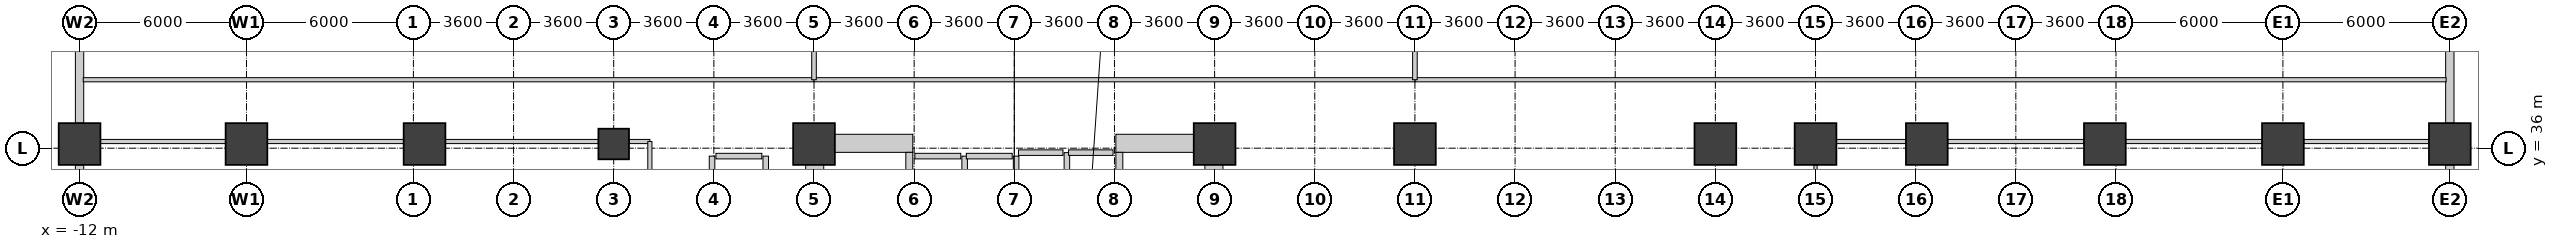
"""IFC4 building model, lengths in metres.
Left out: names, types, materials, properties, quantities, classifications, styles, units other than length and angle.
Written with IfcOpenShell. Run it as: python <this file> out.ifc"""

import sys

from ifc_helpers import new_model, si_unit, direction, frame, frame_2d, origin, origin_2d, place, context, subcontext, project, spatial, rectangle, circle, extrude, source, transform, mapped, element, fill, save


model = new_model("IFC4")
c1 = context("Model", 3, precision=1e-05, world=origin(), true_north=direction((0.0, 1.0)))
c2 = subcontext(c1, "Body", "Model", "MODEL_VIEW")
j1 = project(units=[si_unit("LENGTHUNIT", "METRE"), si_unit("PLANEANGLEUNIT", "RADIAN")], contexts=[c1])
p1 = place(None, origin())
s1 = spatial("IfcSite", under=j1, at=p1, CompositionType="ELEMENT")
p2 = place(p1, origin())
s2 = spatial("IfcBuilding", under=s1, at=p2, CompositionType="ELEMENT")
p3 = place(p2, origin())
s3 = spatial("IfcBuildingStorey", under=s2, at=p3, CompositionType="ELEMENT", Elevation=0.0)
for number, where, z_axis, x_axis in (
    (1, (14.425, 28.2, 0.0), (0.0, 0.0, 1.0), (0.0, 1.0, 0.0)),
    (2, (28.775, 28.2, 0.0), (0.0, 0.0, 1.0), (0.0, 1.0, 0.0)),
):
    element("IfcWall", number, at=place(p3, frame(where, z_axis=z_axis, x_axis=x_axis)), inside=s3, PredefinedType="SHEAR", context=c2, shape_type="SweptSolid", body=[
        extrude(rectangle(XDim=8.3, YDim=0.65, at=frame_2d((4.15, 0.0))), origin(), (0.0, 0.0, 1.0), 5.12),
    ])
for number, where, z_axis, x_axis in (
    (3, (14.75, 36.175, 0.0), (0.0, 0.0, 1.0), (1.0, 0.0, 0.0)),
    (4, (25.25, 36.175, 0.0), (0.0, 0.0, 1.0), (1.0, 0.0, 0.0)),
):
    element("IfcWall", number, at=place(p3, frame(where, z_axis=z_axis, x_axis=x_axis)), inside=s3, PredefinedType="SHEAR", context=c2, shape_type="SweptSolid", body=[
        extrude(rectangle(XDim=3.2, YDim=0.65, at=frame_2d((1.6, 0.0))), origin(), (0.0, 0.0, 1.0), 5.12),
    ])
p4 = place(p3, frame((17.825, 28.85, 0.0), z_axis=(0.0, 0.0, 1.0), x_axis=(0.0, 1.0, 0.0)))
e5 = element("IfcWall", 5, at=p4, inside=s3, PredefinedType="SHEAR", context=c2, shape_type="SweptSolid", body=[
    extrude(rectangle(XDim=7.0, YDim=0.25, at=frame_2d((3.5, 0.0))), origin(), (0.0, 0.0, 1.0), 5.12),
])
p5 = place(p4, frame((0.15, 0.0, 0.0)))
e6 = element("IfcOpeningElement", 6, at=p5, cuts=e5, PredefinedType="OPENING", context=c2, shape_type="SweptSolid", body=[
    extrude(rectangle(XDim=1.1, YDim=2.08, at=frame_2d((0.55, 1.04))), frame((0.0, 0.135, 0.0), z_axis=(0.0, -1.0, 0.0), x_axis=(1.0, 0.0, 0.0)), (0.0, 0.0, 1.0), 0.27),
])
p6 = place(p3, frame((25.375, 28.85, 0.0), z_axis=(0.0, 0.0, 1.0), x_axis=(0.0, 1.0, 0.0)))
e7 = element("IfcWall", 7, at=p6, inside=s3, PredefinedType="SHEAR", context=c2, shape_type="SweptSolid", body=[
    extrude(rectangle(XDim=7.0, YDim=0.25, at=frame_2d((3.5, 0.0))), origin(), (0.0, 0.0, 1.0), 5.12),
])
p7 = place(p6, frame((0.15, 0.0, 0.0)))
e8 = element("IfcOpeningElement", 8, at=p7, cuts=e7, PredefinedType="OPENING", context=c2, shape_type="SweptSolid", body=[
    extrude(rectangle(XDim=1.1, YDim=2.08, at=frame_2d((0.55, 1.04))), frame((0.0, 0.135, 0.0), z_axis=(0.0, -1.0, 0.0), x_axis=(1.0, 0.0, 0.0)), (0.0, 0.0, 1.0), 0.27),
])
m1 = source(origin(), c2, "Body", "SweptSolid", [
    extrude(circle(Radius=0.55, at=origin_2d()), origin(), (0.0, 0.0, 1.0), 5.4),
])
p8 = place(p3, frame((7.2, 36.15, 0.0), z_axis=(0.0, 0.0, 1.0), x_axis=(1.0, 0.0, 0.0)))
e9 = element("IfcColumn", 9, at=p8, inside=s3, PredefinedType="COLUMN", context=c2, shape_type="MappedRepresentation", body=[
    mapped(m1, transform((0.0, 0.0, 0.0), x_axis=(1.0, 0.0, 0.0), y_axis=(0.0, 1.0, 0.0), z_axis=(0.0, 0.0, 1.0), scale=1.0)),
])
m2 = source(origin(), c2, "Body", "SweptSolid", [
    extrude(rectangle(XDim=1.5, YDim=1.5, at=origin_2d()), origin(), (0.0, 0.0, 1.0), 5.4),
])
for number, where, z_axis, x_axis in (
    (10, (14.4, 36.15, 0.0), (0.0, 0.0, 1.0), (1.0, 0.0, 0.0)),
    (11, (28.8, 36.15, 0.0), (0.0, 0.0, 1.0), (1.0, 0.0, 0.0)),
    (12, (36.0, 36.15, 0.0), (0.0, 0.0, 1.0), (1.0, 0.0, 0.0)),
    (13, (46.8, 36.15, 0.0), (0.0, 0.0, 1.0), (1.0, 0.0, 0.0)),
    (14, (50.4, 36.15, 0.0), (0.0, 0.0, 1.0), (1.0, 0.0, 0.0)),
    (15, (54.4, 36.15, 0.0), (0.0, 0.0, 1.0), (1.0, 0.0, 0.0)),
    (16, (0.4, 36.15, 0.0), (0.0, 0.0, 1.0), (1.0, 0.0, 0.0)),
    (17, (60.8, 36.15, 0.0), (0.0, 0.0, 1.0), (1.0, 0.0, 0.0)),
    (18, (-12.0, 36.15, 0.0), (0.0, 0.0, 1.0), (1.0, 0.0, 0.0)),
    (19, (-6.0, 36.15, 0.0), (0.0, 0.0, 1.0), (1.0, 0.0, 0.0)),
    (20, (67.2, 36.15, 0.0), (0.0, 0.0, 1.0), (1.0, 0.0, 0.0)),
    (21, (73.2, 36.15, 0.0), (0.0, 0.0, 1.0), (1.0, 0.0, 0.0)),
):
    element("IfcColumn", number, at=place(p3, frame(where, z_axis=z_axis, x_axis=x_axis)), inside=s3, PredefinedType="COLUMN", context=c2, shape_type="MappedRepresentation", body=[
        mapped(m2, transform((0.0, 0.0, 0.0), x_axis=(1.0, 0.0, 0.0), y_axis=(0.0, 1.0, 0.0), z_axis=(0.0, 0.0, 1.0), scale=1.0)),
    ])
p9 = place(p3, frame((73.2, 35.399, 0.0), z_axis=(0.0, 0.0, 1.0), x_axis=(0.0, -1.0, 0.0)))
e22 = element("IfcWall", 22, at=p9, inside=s3, PredefinedType="STANDARD", context=c2, shape_type="SweptSolid", body=[
    extrude(rectangle(XDim=5.998, YDim=0.3, at=frame_2d((2.999, 0.0))), origin(), (0.0, 0.0, 1.0), 4.5),
])
p10 = place(p9, frame((2.524, 0.0, 0.9)))
e23 = element("IfcOpeningElement", 23, at=p10, cuts=e22, PredefinedType="OPENING", context=c2, shape_type="SweptSolid", body=[
    extrude(rectangle(XDim=0.95, YDim=1.75, at=frame_2d((0.475, 0.875))), frame((0.0, 0.16, 0.0), z_axis=(0.0, -1.0, 0.0), x_axis=(1.0, 0.0, 0.0)), (0.0, 0.0, 1.0), 0.32),
])
p11 = place(p9, frame((1.037, 0.0, 0.9)))
e24 = element("IfcOpeningElement", 24, at=p11, cuts=e22, PredefinedType="OPENING", context=c2, shape_type="SweptSolid", body=[
    extrude(rectangle(XDim=0.95, YDim=1.75, at=frame_2d((0.475, 0.875))), frame((0.0, 0.16, 0.0), z_axis=(0.0, -1.0, 0.0), x_axis=(1.0, 0.0, 0.0)), (0.0, 0.0, 1.0), 0.32),
])
p12 = place(p3, frame((73.2, 44.099, 0.0), z_axis=(0.0, 0.0, 1.0), x_axis=(0.0, -1.0, 0.0)))
e25 = element("IfcWall", 25, at=p12, inside=s3, PredefinedType="STANDARD", context=c2, shape_type="SweptSolid", body=[
    extrude(rectangle(XDim=7.198, YDim=0.3, at=frame_2d((3.599, 0.0))), origin(), (0.0, 0.0, 1.0), 4.5),
])
p13 = place(p12, frame((0.6, 0.0, 0.9)))
e26 = element("IfcOpeningElement", 26, at=p13, cuts=e25, PredefinedType="OPENING", context=c2, shape_type="SweptSolid", body=[
    extrude(rectangle(XDim=2.4, YDim=2.5, at=frame_2d((1.2, 1.25))), frame((0.0, 0.16, 0.0), z_axis=(0.0, -1.0, 0.0), x_axis=(1.0, 0.0, 0.0)), (0.0, 0.0, 1.0), 0.32),
])
p14 = place(p12, frame((3.7, 0.0, 0.9)))
e27 = element("IfcOpeningElement", 27, at=p14, cuts=e25, PredefinedType="OPENING", context=c2, shape_type="SweptSolid", body=[
    extrude(rectangle(XDim=0.95, YDim=1.75, at=frame_2d((0.475, 0.875))), frame((0.0, 0.16, 0.0), z_axis=(0.0, -1.0, 0.0), x_axis=(1.0, 0.0, 0.0)), (0.0, 0.0, 1.0), 0.32),
])
p15 = place(p3, frame((-12.0, 36.901, 0.0), z_axis=(0.0, 0.0, 1.0), x_axis=(0.0, 1.0, 0.0)))
e28 = element("IfcWall", 28, at=p15, inside=s3, PredefinedType="STANDARD", context=c2, shape_type="SweptSolid", body=[
    extrude(rectangle(XDim=7.198, YDim=0.3, at=frame_2d((3.599, 0.0))), origin(), (0.0, 0.0, 1.0), 4.5),
])
p16 = place(p15, frame((4.198, 0.0, 0.9)))
e29 = element("IfcOpeningElement", 29, at=p16, cuts=e28, PredefinedType="OPENING", context=c2, shape_type="SweptSolid", body=[
    extrude(rectangle(XDim=2.4, YDim=2.5, at=frame_2d((1.2, 1.25))), frame((0.0, 0.16, 0.0), z_axis=(0.0, -1.0, 0.0), x_axis=(1.0, 0.0, 0.0)), (0.0, 0.0, 1.0), 0.32),
])
p17 = place(p15, frame((2.548, 0.0, 0.9)))
e30 = element("IfcOpeningElement", 30, at=p17, cuts=e28, PredefinedType="OPENING", context=c2, shape_type="SweptSolid", body=[
    extrude(rectangle(XDim=0.95, YDim=1.75, at=frame_2d((0.475, 0.875))), frame((0.0, 0.16, 0.0), z_axis=(0.0, -1.0, 0.0), x_axis=(1.0, 0.0, 0.0)), (0.0, 0.0, 1.0), 0.32),
])
p18 = place(p3, frame((-12.0, 29.401, 0.0), z_axis=(0.0, 0.0, 1.0), x_axis=(0.0, 1.0, 0.0)))
e31 = element("IfcWall", 31, at=p18, inside=s3, PredefinedType="STANDARD", context=c2, shape_type="SweptSolid", body=[
    extrude(rectangle(XDim=5.998, YDim=0.3, at=frame_2d((2.999, 0.0))), origin(), (0.0, 0.0, 1.0), 4.5),
])
p19 = place(p18, frame((2.074, 0.0, 0.0)))
e32 = element("IfcOpeningElement", 32, at=p19, cuts=e31, PredefinedType="OPENING", context=c2, shape_type="SweptSolid", body=[
    extrude(rectangle(XDim=1.85, YDim=2.25, at=frame_2d((0.925, 1.125))), frame((0.0, 0.16, 0.0), z_axis=(0.0, -1.0, 0.0), x_axis=(1.0, 0.0, 0.0)), (0.0, 0.0, 1.0), 0.32),
])
p20 = place(p3, frame((18.025, 35.715, 0.0), z_axis=(0.0, 0.0, 1.0), x_axis=(1.0, 0.0, 0.0)))
e33 = element("IfcWall", 33, at=p20, inside=s3, PredefinedType="PARTITIONING", context=c2, shape_type="SweptSolid", body=[
    extrude(rectangle(XDim=1.65, YDim=0.2, at=frame_2d((0.825, 0.0))), origin(), (0.0, 0.0, 1.0), 5.1),
])
p21 = place(p3, frame((19.815, 33.485, 0.0), z_axis=(0.0, 0.0, 1.0), x_axis=(0.0, 1.0, 0.0)))
e34 = element("IfcWall", 34, at=p21, inside=s3, PredefinedType="PARTITIONING", context=c2, shape_type="SweptSolid", body=[
    extrude(rectangle(XDim=2.23, YDim=0.2, at=frame_2d((1.115, 0.0))), origin(), (0.0, 0.0, 1.0), 5.1),
])
p22 = place(p3, frame((19.875, 35.715, 0.0), z_axis=(0.0, 0.0, 1.0), x_axis=(1.0, 0.0, 0.0)))
e35 = element("IfcWall", 35, at=p22, inside=s3, PredefinedType="PARTITIONING", context=c2, shape_type="SweptSolid", body=[
    extrude(rectangle(XDim=1.65, YDim=0.2, at=frame_2d((0.825, 0.0))), origin(), (0.0, 0.0, 1.0), 5.1),
])
p23 = place(p3, frame((21.665, 33.485, 0.0), z_axis=(0.0, 0.0, 1.0), x_axis=(0.0, 1.0, 0.0)))
e36 = element("IfcWall", 36, at=p23, inside=s3, PredefinedType="PARTITIONING", context=c2, shape_type="SweptSolid", body=[
    extrude(rectangle(XDim=2.23, YDim=0.2, at=frame_2d((1.115, 0.0))), origin(), (0.0, 0.0, 1.0), 5.1),
])
p24 = place(p3, frame((10.875, 35.715, 0.0), z_axis=(0.0, 0.0, 1.0), x_axis=(1.0, 0.0, 0.0)))
e37 = element("IfcWall", 37, at=p24, inside=s3, PredefinedType="PARTITIONING", context=c2, shape_type="SweptSolid", body=[
    extrude(rectangle(XDim=1.65, YDim=0.2, at=frame_2d((0.825, 0.0))), origin(), (0.0, 0.0, 1.0), 5.1),
])
for number, where, z_axis, x_axis in (
    (38, (10.735, 33.485, 0.0), (0.0, 0.0, 1.0), (0.0, 1.0, 0.0)),
    (39, (12.665, 33.485, 0.0), (0.0, 0.0, 1.0), (0.0, 1.0, 0.0)),
):
    element("IfcWall", number, at=place(p3, frame(where, z_axis=z_axis, x_axis=x_axis)), inside=s3, PredefinedType="PARTITIONING", context=c2, shape_type="SweptSolid", body=[
        extrude(rectangle(XDim=2.23, YDim=0.2, at=frame_2d((1.115, 0.0))), origin(), (0.0, 0.0, 1.0), 5.1),
    ])
p25 = place(p3, frame((21.75, 35.84, 0.0), z_axis=(0.0, 0.0, 1.0), x_axis=(1.0, 0.0, 0.0)))
e40 = element("IfcWall", 40, at=p25, inside=s3, PredefinedType="PARTITIONING", context=c2, shape_type="SweptSolid", body=[
    extrude(rectangle(XDim=1.6, YDim=0.2, at=frame_2d((0.8, 0.0))), origin(), (0.0, 0.0, 1.0), 3.9),
])
p26 = place(p3, frame((23.49, 33.16, 0.0), z_axis=(0.0, 0.0, 1.0), x_axis=(0.0, 1.0, 0.0)))
e41 = element("IfcWall", 41, at=p26, inside=s3, PredefinedType="PARTITIONING", context=c2, shape_type="SweptSolid", body=[
    extrude(rectangle(XDim=2.68, YDim=0.2, at=frame_2d((1.34, 0.0))), origin(), (0.0, 0.0, 1.0), 5.1),
])
p27 = place(p3, frame((23.55, 35.84, 0.0), z_axis=(0.0, 0.0, 1.0), x_axis=(1.0, 0.0, 0.0)))
e42 = element("IfcWall", 42, at=p27, inside=s3, PredefinedType="PARTITIONING", context=c2, shape_type="SweptSolid", body=[
    extrude(rectangle(XDim=1.6, YDim=0.2, at=frame_2d((0.8, 0.0))), origin(), (0.0, 0.0, 1.0), 3.9),
])
p28 = place(p3, frame((36.0, 38.46, 0.0), z_axis=(0.0, 0.0, 1.0), x_axis=(1.0, 0.0, 0.0)))
e43 = element("IfcWall", 43, at=p28, inside=s3, PredefinedType="PARTITIONING", context=c2, shape_type="SweptSolid", body=[
    extrude(rectangle(XDim=37.068, YDim=0.15, at=frame_2d((18.534, 0.0))), origin(), (0.0, 0.0, 1.0), 5.1),
])
p29 = place(p28, frame((17.884, 0.0, 0.0)))
e44 = element("IfcOpeningElement", 44, at=p29, cuts=e43, PredefinedType="OPENING", context=c2, shape_type="SweptSolid", body=[
    extrude(rectangle(XDim=1.3, YDim=2.12, at=frame_2d((0.65, 1.06))), frame((0.0, 0.085, 0.0), z_axis=(0.0, -1.0, 0.0), x_axis=(1.0, 0.0, 0.0)), (0.0, 0.0, 1.0), 0.17),
])
p30 = place(p3, frame((-11.868, 38.46, 0.0), z_axis=(0.0, 0.0, 1.0), x_axis=(1.0, 0.0, 0.0)))
e45 = element("IfcWall", 45, at=p30, inside=s3, PredefinedType="PARTITIONING", context=c2, shape_type="SweptSolid", body=[
    extrude(rectangle(XDim=26.268, YDim=0.15, at=frame_2d((13.134, 0.0))), origin(), (0.0, 0.0, 1.0), 5.1),
])
p31 = place(p30, frame((12.484, 0.0, 0.0)))
e46 = element("IfcOpeningElement", 46, at=p31, cuts=e45, PredefinedType="OPENING", context=c2, shape_type="SweptSolid", body=[
    extrude(rectangle(XDim=1.3, YDim=2.12, at=frame_2d((0.65, 1.06))), frame((0.0, 0.085, 0.0), z_axis=(0.0, -1.0, 0.0), x_axis=(1.0, 0.0, 0.0)), (0.0, 0.0, 1.0), 0.17),
])
p32 = place(p3, frame((51.15, 36.24, 0.0), z_axis=(0.0, 0.0, 1.0), x_axis=(1.0, 0.0, 0.0)))
e47 = element("IfcWall", 47, at=p32, inside=s3, PredefinedType="PARTITIONING", context=c2, shape_type="SweptSolid", body=[
    extrude(rectangle(XDim=2.5, YDim=0.15, at=frame_2d((1.25, 0.0))), origin(), (0.0, 0.0, 1.0), 4.4),
])
p33 = place(p32, frame((0.6, 0.0, 0.0)))
e48 = element("IfcOpeningElement", 48, at=p33, cuts=e47, PredefinedType="OPENING", context=c2, shape_type="SweptSolid", body=[
    extrude(rectangle(XDim=1.3, YDim=2.12, at=frame_2d((0.65, 1.06))), frame((0.0, 0.085, 0.0), z_axis=(0.0, -1.0, 0.0), x_axis=(1.0, 0.0, 0.0)), (0.0, 0.0, 1.0), 0.17),
])
p34 = place(p3, frame((55.15, 36.24, 0.0), z_axis=(0.0, 0.0, 1.0), x_axis=(1.0, 0.0, 0.0)))
e49 = element("IfcWall", 49, at=p34, inside=s3, PredefinedType="PARTITIONING", context=c2, shape_type="SweptSolid", body=[
    extrude(rectangle(XDim=4.9, YDim=0.15, at=frame_2d((2.45, 0.0))), origin(), (0.0, 0.0, 1.0), 4.4),
])
p35 = place(p3, frame((61.55, 36.24, 0.0), z_axis=(0.0, 0.0, 1.0), x_axis=(1.0, 0.0, 0.0)))
e50 = element("IfcWall", 50, at=p35, inside=s3, PredefinedType="PARTITIONING", context=c2, shape_type="SweptSolid", body=[
    extrude(rectangle(XDim=4.9, YDim=0.15, at=frame_2d((2.45, 0.0))), origin(), (0.0, 0.0, 1.0), 4.4),
])
p36 = place(p3, frame((67.95, 36.24, 0.0), z_axis=(0.0, 0.0, 1.0), x_axis=(1.0, 0.0, 0.0)))
e51 = element("IfcWall", 51, at=p36, inside=s3, PredefinedType="PARTITIONING", context=c2, shape_type="SweptSolid", body=[
    extrude(rectangle(XDim=4.5, YDim=0.15, at=frame_2d((2.25, 0.0))), origin(), (0.0, 0.0, 1.0), 4.4),
])
p37 = place(p3, frame((14.4, 38.46, 0.0), z_axis=(0.0, 0.0, 1.0), x_axis=(1.0, 0.0, 0.0)))
e52 = element("IfcWall", 52, at=p37, inside=s3, PredefinedType="PARTITIONING", context=c2, shape_type="SweptSolid", body=[
    extrude(rectangle(XDim=21.6, YDim=0.15, at=frame_2d((10.8, 0.0))), origin(), (0.0, 0.0, 1.0), 5.1),
])
p38 = place(p37, frame((10.15, 0.0, 0.0)))
e53 = element("IfcOpeningElement", 53, at=p38, cuts=e52, PredefinedType="OPENING", context=c2, shape_type="SweptSolid", body=[
    extrude(rectangle(XDim=1.3, YDim=2.12, at=frame_2d((0.65, 1.06))), frame((0.0, 0.085, 0.0), z_axis=(0.0, -1.0, 0.0), x_axis=(1.0, 0.0, 0.0)), (0.0, 0.0, 1.0), 0.17),
])
p39 = place(p3, frame((-11.25, 36.24, 0.0), z_axis=(0.0, 0.0, 1.0), x_axis=(1.0, 0.0, 0.0)))
e54 = element("IfcWall", 54, at=p39, inside=s3, PredefinedType="PARTITIONING", context=c2, shape_type="SweptSolid", body=[
    extrude(rectangle(XDim=4.5, YDim=0.15, at=frame_2d((2.25, 0.0))), origin(), (0.0, 0.0, 1.0), 4.4),
])
p40 = place(p3, frame((-5.25, 36.24, 0.0), z_axis=(0.0, 0.0, 1.0), x_axis=(1.0, 0.0, 0.0)))
e55 = element("IfcWall", 55, at=p40, inside=s3, PredefinedType="PARTITIONING", context=c2, shape_type="SweptSolid", body=[
    extrude(rectangle(XDim=4.9, YDim=0.15, at=frame_2d((2.45, 0.0))), origin(), (0.0, 0.0, 1.0), 4.4),
])
p41 = place(p3, frame((1.15, 36.24, 0.0), z_axis=(0.0, 0.0, 1.0), x_axis=(1.0, 0.0, 0.0)))
e56 = element("IfcWall", 56, at=p41, inside=s3, PredefinedType="PARTITIONING", context=c2, shape_type="SweptSolid", body=[
    extrude(rectangle(XDim=5.5, YDim=0.15, at=frame_2d((2.75, 0.0))), origin(), (0.0, 0.0, 1.0), 4.4),
])
p42 = place(p3, frame((7.75, 36.24, 0.0), z_axis=(0.0, 0.0, 1.0), x_axis=(1.0, 0.0, 0.0)))
e57 = element("IfcWall", 57, at=p42, inside=s3, PredefinedType="PARTITIONING", context=c2, shape_type="SweptSolid", body=[
    extrude(rectangle(XDim=0.75, YDim=0.15, at=frame_2d((0.375, 0.0))), origin(), (0.0, 0.0, 1.0), 4.4),
])
p43 = place(p3, frame((8.5, 28.56, 0.0), z_axis=(0.0, 0.0, 1.0), x_axis=(0.0, 1.0, 0.0)))
e58 = element("IfcWall", 58, at=p43, inside=s3, PredefinedType="PARTITIONING", context=c2, shape_type="SweptSolid", body=[
    extrude(rectangle(XDim=7.68, YDim=0.15, at=frame_2d((3.84, 0.0))), origin(), (0.0, 0.0, 1.0), 5.1),
])
p44 = place(p3, frame((50.4, 29.4, 0.0), z_axis=(0.0, 0.0, 1.0), x_axis=(0.0, 1.0, 0.0)))
e59 = element("IfcWall", 59, at=p44, inside=s3, PredefinedType="PARTITIONING", context=c2, shape_type="SweptSolid", body=[
    extrude(rectangle(XDim=6.0, YDim=0.115, at=frame_2d((3.0, 0.0))), origin(), (0.0, 0.0, 1.0), 5.1),
])
for number, where, z_axis, x_axis in (
    (60, (14.4, 38.46, 0.0), (0.0, 0.0, 1.0), (0.0, 1.0, 0.0)),
    (61, (36.0, 38.46, 0.0), (0.0, 0.0, 1.0), (0.0, 1.0, 0.0)),
):
    element("IfcWall", number, at=place(p3, frame(where, z_axis=z_axis, x_axis=x_axis)), inside=s3, PredefinedType="PARTITIONING", context=c2, shape_type="SweptSolid", body=[
        extrude(rectangle(XDim=6.408, YDim=0.165, at=frame_2d((3.204, 0.0))), origin(), (0.0, 0.0, 1.0), 4.5),
    ])
p45 = place(p14, origin())
e62 = element("IfcWindow", 62, at=p45, inside=s3, PartitioningType="SINGLE_PANEL", PredefinedType="WINDOW", context=c2, shape_type="SweptSolid", body=[
    extrude(rectangle(XDim=0.95, YDim=1.75, at=frame_2d((0.475, 0.875))), frame((0.0, 0.03, 0.0), z_axis=(0.0, -1.0, 0.0), x_axis=(1.0, 0.0, 0.0)), (0.0, 0.0, 1.0), 0.06),
])
fill(e27, e62)
p46 = place(p17, origin())
e63 = element("IfcWindow", 63, at=p46, inside=s3, PartitioningType="SINGLE_PANEL", PredefinedType="WINDOW", context=c2, shape_type="SweptSolid", body=[
    extrude(rectangle(XDim=0.95, YDim=1.75, at=frame_2d((0.475, 0.875))), frame((0.0, 0.03, 0.0), z_axis=(0.0, -1.0, 0.0), x_axis=(1.0, 0.0, 0.0)), (0.0, 0.0, 1.0), 0.06),
])
fill(e30, e63)
p47 = place(p29, origin())
e64 = element("IfcDoor", 64, at=p47, inside=s3, OperationType="DOUBLE_DOOR_SINGLE_SWING", PredefinedType="DOOR", context=c2, shape_type="SweptSolid", body=[
    extrude(rectangle(XDim=1.3, YDim=2.12, at=frame_2d((0.65, 1.06))), frame((0.0, 0.025, 0.0), z_axis=(0.0, -1.0, 0.0), x_axis=(1.0, 0.0, 0.0)), (0.0, 0.0, 1.0), 0.05),
])
fill(e44, e64)
p48 = place(p31, origin())
e65 = element("IfcDoor", 65, at=p48, inside=s3, OperationType="DOUBLE_DOOR_SINGLE_SWING", PredefinedType="DOOR", context=c2, shape_type="SweptSolid", body=[
    extrude(rectangle(XDim=1.3, YDim=2.12, at=frame_2d((0.65, 1.06))), frame((0.0, 0.025, 0.0), z_axis=(0.0, -1.0, 0.0), x_axis=(1.0, 0.0, 0.0)), (0.0, 0.0, 1.0), 0.05),
])
fill(e46, e65)
p49 = place(p33, origin())
e66 = element("IfcDoor", 66, at=p49, inside=s3, OperationType="DOUBLE_DOOR_SINGLE_SWING", PredefinedType="DOOR", context=c2, shape_type="SweptSolid", body=[
    extrude(rectangle(XDim=1.3, YDim=2.12, at=frame_2d((0.65, 1.06))), frame((0.0, 0.025, 0.0), z_axis=(0.0, -1.0, 0.0), x_axis=(1.0, 0.0, 0.0)), (0.0, 0.0, 1.0), 0.05),
])
fill(e48, e66)
p50 = place(p38, origin())
e67 = element("IfcDoor", 67, at=p50, inside=s3, OperationType="DOUBLE_DOOR_SINGLE_SWING", PredefinedType="DOOR", context=c2, shape_type="SweptSolid", body=[
    extrude(rectangle(XDim=1.3, YDim=2.12, at=frame_2d((0.65, 1.06))), frame((0.0, 0.025, 0.0), z_axis=(0.0, -1.0, 0.0), x_axis=(1.0, 0.0, 0.0)), (0.0, 0.0, 1.0), 0.05),
])
fill(e53, e67)
save(model, sys.argv[1])
